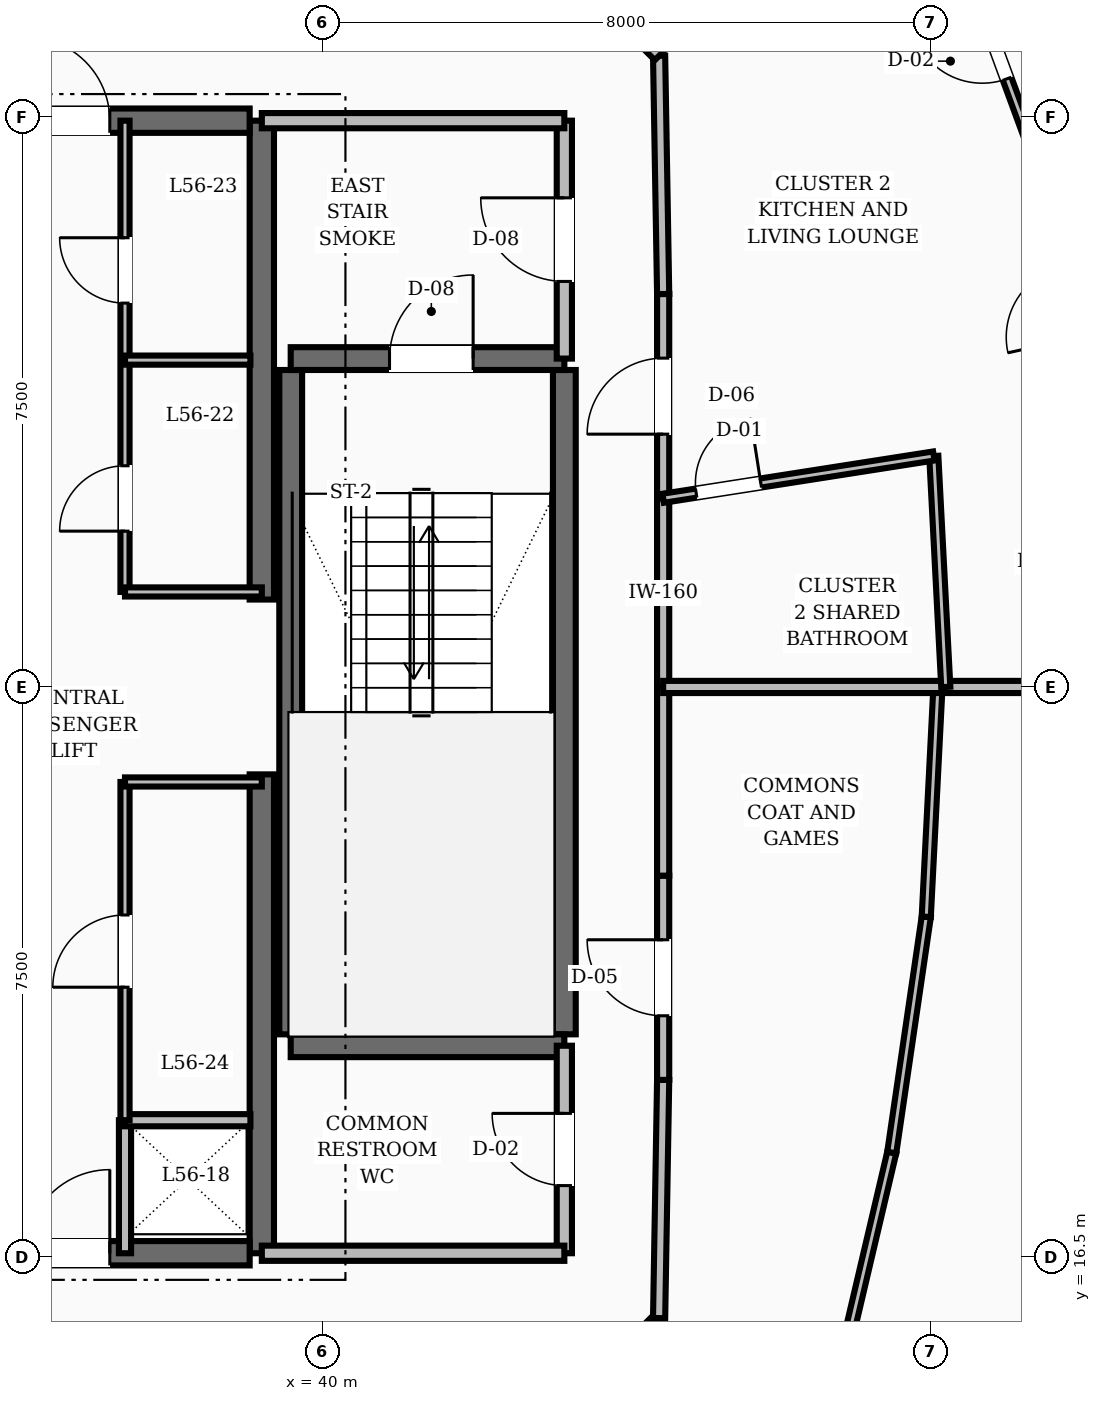
"""IFC4 building model, lengths in metres.
Left out: names, types, materials, properties, quantities, classifications, styles, units other than length and angle.
Written with IfcOpenShell. Run it as: python <this file> out.ifc"""

import sys

from ifc_helpers import new_model, si_unit, direction, frame, frame_2d, origin, place, context, subcontext, project, spatial, rectangle, extrude, element, fill, save


model = new_model("IFC4")
c1 = context("Model", 3, precision=1e-05, world=origin(), true_north=direction((0.0, 1.0)))
c2 = subcontext(c1, "Body", "Model", "MODEL_VIEW")
j1 = project(units=[si_unit("LENGTHUNIT", "METRE"), si_unit("PLANEANGLEUNIT", "RADIAN")], contexts=[c1])
p1 = place(None, origin())
s1 = spatial("IfcSite", under=j1, at=p1, CompositionType="ELEMENT")
p2 = place(p1, origin())
s2 = spatial("IfcBuilding", under=s1, at=p2, CompositionType="ELEMENT")
p3 = place(p2, frame((0.0, 0.0, 218.4)))
s3 = spatial("IfcBuildingStorey", under=s2, at=p3, CompositionType="ELEMENT", Elevation=218.4)
for number, where, z_axis, x_axis in (
    (1, (39.2, 16.55, 0.0), (0.0, 0.0, 1.0), (0.0, 1.0, 0.0)),
    (2, (39.2, 25.15, 0.0), (0.0, 0.0, 1.0), (0.0, 1.0, 0.0)),
):
    element("IfcWall", number, at=place(p3, frame(where, z_axis=z_axis, x_axis=x_axis)), inside=s3, PredefinedType="SHEAR", context=c2, shape_type="SweptSolid", body=[
        extrude(rectangle(XDim=6.3, YDim=0.32, at=frame_2d((3.15, 0.0))), origin(), (0.0, 0.0, 1.0), 3.6),
    ])
p4 = place(p3, frame((35.8, 16.55, 0.0), z_axis=(0.0, 0.0, 1.0), x_axis=(1.0, 0.0, 0.0)))
e3 = element("IfcWall", 3, at=p4, inside=s3, PredefinedType="SHEAR", context=c2, shape_type="SweptSolid", body=[
    extrude(rectangle(XDim=3.24, YDim=0.32, at=frame_2d((1.62, 0.0))), origin(), (0.0, 0.0, 1.0), 3.6),
])
p5 = place(p4, frame((0.3, 0.0, 0.0)))
e4 = element("IfcOpeningElement", 4, at=p5, cuts=e3, PredefinedType="OPENING", context=c2, shape_type="SweptSolid", body=[
    extrude(rectangle(XDim=1.1, YDim=2.1, at=frame_2d((0.55, 1.05))), frame((0.0, 0.17, 0.0), z_axis=(0.0, -1.0, 0.0), x_axis=(1.0, 0.0, 0.0)), (0.0, 0.0, 1.0), 0.34),
])
p6 = place(p3, frame((35.8, 31.45, 0.0), z_axis=(0.0, 0.0, 1.0), x_axis=(1.0, 0.0, 0.0)))
e5 = element("IfcWall", 5, at=p6, inside=s3, PredefinedType="SHEAR", context=c2, shape_type="SweptSolid", body=[
    extrude(rectangle(XDim=3.24, YDim=0.32, at=frame_2d((1.62, 0.0))), origin(), (0.0, 0.0, 1.0), 3.6),
])
p7 = place(p6, frame((0.3, 0.0, 0.0)))
e6 = element("IfcOpeningElement", 6, at=p7, cuts=e5, PredefinedType="OPENING", context=c2, shape_type="SweptSolid", body=[
    extrude(rectangle(XDim=1.1, YDim=2.1, at=frame_2d((0.55, 1.05))), frame((0.0, 0.17, 0.0), z_axis=(0.0, -1.0, 0.0), x_axis=(1.0, 0.0, 0.0)), (0.0, 0.0, 1.0), 0.34),
])
for number, where, z_axis, x_axis in (
    (7, (43.18, 19.43, 0.0), (0.0, 0.0, 1.0), (0.0, 1.0, 0.0)),
    (8, (39.58, 19.43, 0.0), (0.0, 0.0, 1.0), (0.0, 1.0, 0.0)),
):
    element("IfcWall", number, at=place(p3, frame(where, z_axis=z_axis, x_axis=x_axis)), inside=s3, PredefinedType="SHEAR", context=c2, shape_type="SweptSolid", body=[
        extrude(rectangle(XDim=8.74, YDim=0.3, at=frame_2d((4.37, 0.0))), origin(), (0.0, 0.0, 1.0), 3.6),
    ])
p8 = place(p3, frame((39.58, 19.28, 0.0), z_axis=(0.0, 0.0, 1.0), x_axis=(1.0, 0.0, 0.0)))
e9 = element("IfcWall", 9, at=p8, inside=s3, PredefinedType="SHEAR", context=c2, shape_type="SweptSolid", body=[
    extrude(rectangle(XDim=3.6, YDim=0.3, at=frame_2d((1.8, 0.0))), origin(), (0.0, 0.0, 1.0), 3.6),
])
p9 = place(p3, frame((39.58, 28.32, 0.0), z_axis=(0.0, 0.0, 1.0), x_axis=(1.0, 0.0, 0.0)))
e10 = element("IfcWall", 10, at=p9, inside=s3, PredefinedType="SHEAR", context=c2, shape_type="SweptSolid", body=[
    extrude(rectangle(XDim=3.6, YDim=0.3, at=frame_2d((1.8, 0.0))), origin(), (0.0, 0.0, 1.0), 3.6),
])
p10 = place(p9, frame((1.3, 0.0, 0.0)))
e11 = element("IfcOpeningElement", 11, at=p10, cuts=e10, PredefinedType="OPENING", context=c2, shape_type="SweptSolid", body=[
    extrude(rectangle(XDim=1.1, YDim=2.1, at=frame_2d((0.55, 1.05))), frame((0.0, 0.16, 0.0), z_axis=(0.0, -1.0, 0.0), x_axis=(1.0, 0.0, 0.0)), (0.0, 0.0, 1.0), 0.32),
])
p11 = place(p3, frame((43.18, 28.32, 0.0), z_axis=(0.0, 0.0, 1.0), x_axis=(0.0, 1.0, 0.0)))
e12 = element("IfcWall", 12, at=p11, inside=s3, PredefinedType="SOLIDWALL", context=c2, shape_type="SweptSolid", body=[
    extrude(rectangle(XDim=3.13, YDim=0.2, at=frame_2d((1.565, 0.0))), origin(), (0.0, 0.0, 1.0), 2.87),
])
p12 = place(p11, frame((1.015, 0.0, 0.0)))
e13 = element("IfcOpeningElement", 13, at=p12, cuts=e12, PredefinedType="OPENING", context=c2, shape_type="SweptSolid", body=[
    extrude(rectangle(XDim=1.1, YDim=2.1, at=frame_2d((0.55, 1.05))), frame((0.0, 0.11, 0.0), z_axis=(0.0, -1.0, 0.0), x_axis=(1.0, 0.0, 0.0)), (0.0, 0.0, 1.0), 0.22),
])
p13 = place(p3, frame((39.2, 31.45, 0.0), z_axis=(0.0, 0.0, 1.0), x_axis=(1.0, 0.0, 0.0)))
e14 = element("IfcWall", 14, at=p13, inside=s3, PredefinedType="SOLIDWALL", context=c2, shape_type="SweptSolid", body=[
    extrude(rectangle(XDim=3.98, YDim=0.2, at=frame_2d((1.99, 0.0))), origin(), (0.0, 0.0, 1.0), 2.87),
])
p14 = place(p3, frame((43.18, 16.55, 0.0), z_axis=(0.0, 0.0, 1.0), x_axis=(0.0, 1.0, 0.0)))
e15 = element("IfcWall", 15, at=p14, inside=s3, PredefinedType="SOLIDWALL", context=c2, shape_type="SweptSolid", body=[
    extrude(rectangle(XDim=2.73, YDim=0.2, at=frame_2d((1.365, 0.0))), origin(), (0.0, 0.0, 1.0), 2.87),
])
p15 = place(p14, frame((0.89, 0.0, 0.0)))
e16 = element("IfcOpeningElement", 16, at=p15, cuts=e15, PredefinedType="OPENING", context=c2, shape_type="SweptSolid", body=[
    extrude(rectangle(XDim=0.95, YDim=2.1, at=frame_2d((0.475, 1.05))), frame((0.0, 0.11, 0.0), z_axis=(0.0, -1.0, 0.0), x_axis=(1.0, 0.0, 0.0)), (0.0, 0.0, 1.0), 0.22),
])
p16 = place(p3, frame((39.2, 16.55, 0.0), z_axis=(0.0, 0.0, 1.0), x_axis=(1.0, 0.0, 0.0)))
e17 = element("IfcWall", 17, at=p16, inside=s3, PredefinedType="SOLIDWALL", context=c2, shape_type="SweptSolid", body=[
    extrude(rectangle(XDim=3.98, YDim=0.2, at=frame_2d((1.99, 0.0))), origin(), (0.0, 0.0, 1.0), 2.87),
])
p17 = place(p3, frame((37.4, 16.55, 0.0), z_axis=(0.0, 0.0, 1.0), x_axis=(0.0, 1.0, 0.0)))
e18 = element("IfcWall", 18, at=p17, inside=s3, PredefinedType="SOLIDWALL", context=c2, shape_type="SweptSolid", body=[
    extrude(rectangle(XDim=1.75, YDim=0.16, at=frame_2d((0.875, 0.0))), origin(), (0.0, 0.0, 1.0), 2.87),
])
p18 = place(p3, frame((37.4, 18.3, 0.0), z_axis=(0.0, 0.0, 1.0), x_axis=(1.0, 0.0, 0.0)))
e19 = element("IfcWall", 19, at=p18, inside=s3, PredefinedType="SOLIDWALL", context=c2, shape_type="SweptSolid", body=[
    extrude(rectangle(XDim=1.65, YDim=0.16, at=frame_2d((0.825, 0.0))), origin(), (0.0, 0.0, 1.0), 2.87),
])
p19 = place(p3, frame((37.4, 25.25, 0.0), z_axis=(0.0, 0.0, 1.0), x_axis=(0.0, 1.0, 0.0)))
e20 = element("IfcWall", 20, at=p19, inside=s3, PredefinedType="PARTITIONING", context=c2, shape_type="SweptSolid", body=[
    extrude(rectangle(XDim=6.2, YDim=0.12, at=frame_2d((3.1, 0.0))), origin(), (0.0, 0.0, 1.0), 2.87),
])
p20 = place(p19, frame((0.8, 0.0, 0.0)))
e21 = element("IfcOpeningElement", 21, at=p20, cuts=e20, PredefinedType="OPENING", context=c2, shape_type="SweptSolid", body=[
    extrude(rectangle(XDim=0.86, YDim=2.1, at=frame_2d((0.43, 1.05))), frame((0.0, 0.07, 0.0), z_axis=(0.0, -1.0, 0.0), x_axis=(1.0, 0.0, 0.0)), (0.0, 0.0, 1.0), 0.14),
])
p21 = place(p19, frame((3.8, 0.0, 0.0)))
e22 = element("IfcOpeningElement", 22, at=p21, cuts=e20, PredefinedType="OPENING", context=c2, shape_type="SweptSolid", body=[
    extrude(rectangle(XDim=0.86, YDim=2.1, at=frame_2d((0.43, 1.05))), frame((0.0, 0.07, 0.0), z_axis=(0.0, -1.0, 0.0), x_axis=(1.0, 0.0, 0.0)), (0.0, 0.0, 1.0), 0.14),
])
p22 = place(p3, frame((37.4, 25.25, 0.0), z_axis=(0.0, 0.0, 1.0), x_axis=(1.0, 0.0, 0.0)))
e23 = element("IfcWall", 23, at=p22, inside=s3, PredefinedType="PARTITIONING", context=c2, shape_type="SweptSolid", body=[
    extrude(rectangle(XDim=1.8, YDim=0.12, at=frame_2d((0.9, 0.0))), origin(), (0.0, 0.0, 1.0), 2.87),
])
p23 = place(p3, frame((37.4, 18.3, 0.0), z_axis=(0.0, 0.0, 1.0), x_axis=(0.0, 1.0, 0.0)))
e24 = element("IfcWall", 24, at=p23, inside=s3, PredefinedType="PARTITIONING", context=c2, shape_type="SweptSolid", body=[
    extrude(rectangle(XDim=4.45, YDim=0.12, at=frame_2d((2.225, 0.0))), origin(), (0.0, 0.0, 1.0), 2.87),
])
p24 = place(p23, frame((1.75, 0.0, 0.0)))
e25 = element("IfcOpeningElement", 25, at=p24, cuts=e24, PredefinedType="OPENING", context=c2, shape_type="SweptSolid", body=[
    extrude(rectangle(XDim=0.95, YDim=2.1, at=frame_2d((0.475, 1.05))), frame((0.0, 0.07, 0.0), z_axis=(0.0, -1.0, 0.0), x_axis=(1.0, 0.0, 0.0)), (0.0, 0.0, 1.0), 0.14),
])
p25 = place(p3, frame((37.4, 22.75, 0.0), z_axis=(0.0, 0.0, 1.0), x_axis=(1.0, 0.0, 0.0)))
e26 = element("IfcWall", 26, at=p25, inside=s3, PredefinedType="PARTITIONING", context=c2, shape_type="SweptSolid", body=[
    extrude(rectangle(XDim=1.8, YDim=0.12, at=frame_2d((0.9, 0.0))), origin(), (0.0, 0.0, 1.0), 2.87),
])
p26 = place(p3, frame((37.4, 28.3, 0.0), z_axis=(0.0, 0.0, 1.0), x_axis=(1.0, 0.0, 0.0)))
e27 = element("IfcWall", 27, at=p26, inside=s3, PredefinedType="PARTITIONING", context=c2, shape_type="SweptSolid", body=[
    extrude(rectangle(XDim=1.65, YDim=0.12, at=frame_2d((0.825, 0.0))), origin(), (0.0, 0.0, 1.0), 2.87),
])
p27 = place(p3, frame((44.48, 24.0, 0.0), z_axis=(0.0, 0.0, 1.0), x_axis=(0.0, 1.0, 0.0)))
e28 = element("IfcWall", 28, at=p27, inside=s3, PredefinedType="SOLIDWALL", context=c2, shape_type="SweptSolid", body=[
    extrude(rectangle(XDim=2.482, YDim=0.16, at=frame_2d((1.241, 0.0))), origin(), (0.0, 0.0, 1.0), 2.87),
])
p28 = place(p3, frame((44.48, 26.482, 0.0), z_axis=(0.0, 0.0, 1.0), x_axis=(0.0, 1.0, 0.0)))
e29 = element("IfcWall", 29, at=p28, inside=s3, PredefinedType="SOLIDWALL", context=c2, shape_type="SweptSolid", body=[
    extrude(rectangle(XDim=2.687, YDim=0.16, at=frame_2d((1.344, 0.0))), origin(), (0.0, 0.0, 1.0), 2.87),
])
p29 = place(p28, frame((0.844, 0.0, 0.0)))
e30 = element("IfcOpeningElement", 30, at=p29, cuts=e29, PredefinedType="OPENING", context=c2, shape_type="SweptSolid", body=[
    extrude(rectangle(XDim=1.0, YDim=2.1, at=frame_2d((0.5, 1.05))), frame((0.0, 0.09, 0.0), z_axis=(0.0, -1.0, 0.0), x_axis=(1.0, 0.0, 0.0)), (0.0, 0.0, 1.0), 0.18),
])
p30 = place(p3, frame((44.48, 29.169, 0.0), z_axis=(0.0, 0.0, 1.0), x_axis=(-0.016981035134, 0.999855811828, 0.0)))
e31 = element("IfcWall", 31, at=p30, inside=s3, PredefinedType="SOLIDWALL", context=c2, shape_type="SweptSolid", body=[
    extrude(rectangle(XDim=3.134, YDim=0.16, at=frame_2d((1.567, 0.0))), origin(), (0.0, 0.0, 1.0), 2.87),
])
for number, where, z_axis, x_axis in (
    (32, (44.427, 32.303, 0.0), (0.0, 0.0, 1.0), (-0.707, 0.707, 0.0)),
    (33, (42.365, 13.635, 0.0), (0.0, 0.0, 1.0), (0.707, 0.707, 0.0)),
):
    element("IfcWall", number, at=place(p3, frame(where, z_axis=z_axis, x_axis=x_axis)), inside=s3, PredefinedType="SOLIDWALL", context=c2, shape_type="SweptSolid", body=[
        extrude(rectangle(XDim=2.916, YDim=0.16, at=frame_2d((1.458, 0.0))), origin(), (0.0, 0.0, 1.0), 2.87),
    ])
p31 = place(p3, frame((44.427, 15.697, 0.0), z_axis=(0.0, 0.0, 1.0), x_axis=(0.016981035134, 0.999855811828, 0.0)))
e34 = element("IfcWall", 34, at=p31, inside=s3, PredefinedType="SOLIDWALL", context=c2, shape_type="SweptSolid", body=[
    extrude(rectangle(XDim=3.134, YDim=0.16, at=frame_2d((1.567, 0.0))), origin(), (0.0, 0.0, 1.0), 2.87),
])
p32 = place(p3, frame((44.48, 18.831, 0.0), z_axis=(0.0, 0.0, 1.0), x_axis=(0.0, 1.0, 0.0)))
e35 = element("IfcWall", 35, at=p32, inside=s3, PredefinedType="SOLIDWALL", context=c2, shape_type="SweptSolid", body=[
    extrude(rectangle(XDim=2.687, YDim=0.16, at=frame_2d((1.344, 0.0))), origin(), (0.0, 0.0, 1.0), 2.87),
])
p33 = place(p32, frame((0.844, 0.0, 0.0)))
e36 = element("IfcOpeningElement", 36, at=p33, cuts=e35, PredefinedType="OPENING", context=c2, shape_type="SweptSolid", body=[
    extrude(rectangle(XDim=1.0, YDim=2.1, at=frame_2d((0.5, 1.05))), frame((0.0, 0.09, 0.0), z_axis=(0.0, -1.0, 0.0), x_axis=(1.0, 0.0, 0.0)), (0.0, 0.0, 1.0), 0.18),
])
p34 = place(p3, frame((44.48, 21.518, 0.0), z_axis=(0.0, 0.0, 1.0), x_axis=(0.0, 1.0, 0.0)))
e37 = element("IfcWall", 37, at=p34, inside=s3, PredefinedType="SOLIDWALL", context=c2, shape_type="SweptSolid", body=[
    extrude(rectangle(XDim=2.482, YDim=0.16, at=frame_2d((1.241, 0.0))), origin(), (0.0, 0.0, 1.0), 2.87),
])
p35 = place(p3, frame((46.715, 14.588, 0.0), z_axis=(0.0, 0.0, 1.0), x_axis=(0.228745067829, 0.97348636043, 0.0)))
e38 = element("IfcWall", 38, at=p35, inside=s3, PredefinedType="PARTITIONING", context=c2, shape_type="SweptSolid", body=[
    extrude(rectangle(XDim=3.376, YDim=0.12, at=frame_2d((1.688, 0.0))), origin(), (0.0, 0.0, 1.0), 2.87),
])
p36 = place(p3, frame((47.487, 17.875, 0.0), z_axis=(0.0, 0.0, 1.0), x_axis=(0.144920046389, 0.989443368847, 0.0)))
e39 = element("IfcWall", 39, at=p36, inside=s3, PredefinedType="PARTITIONING", context=c2, shape_type="SweptSolid", body=[
    extrude(rectangle(XDim=3.135, YDim=0.12, at=frame_2d((1.568, 0.0))), origin(), (0.0, 0.0, 1.0), 2.87),
])
p37 = place(p3, frame((47.942, 20.977, 0.0), z_axis=(0.0, 0.0, 1.0), x_axis=(0.050645517022, 0.998716692364, 0.0)))
e40 = element("IfcWall", 40, at=p37, inside=s3, PredefinedType="PARTITIONING", context=c2, shape_type="SweptSolid", body=[
    extrude(rectangle(XDim=3.027, YDim=0.12, at=frame_2d((1.514, 0.0))), origin(), (0.0, 0.0, 1.0), 2.87),
])
p38 = place(p3, frame((44.48, 24.0, 0.0), z_axis=(0.0, 0.0, 1.0), x_axis=(1.0, 0.0, 0.0)))
e41 = element("IfcWall", 41, at=p38, inside=s3, PredefinedType="SOLIDWALL", context=c2, shape_type="SweptSolid", body=[
    extrude(rectangle(XDim=10.279, YDim=0.16, at=frame_2d((5.139, 0.0))), origin(), (0.0, 0.0, 1.0), 2.87),
])
p39 = place(p3, frame((48.198, 24.0, 0.0), z_axis=(0.0, 0.0, 1.0), x_axis=(-0.051830297727, 0.998655906826, 0.0)))
e42 = element("IfcWall", 42, at=p39, inside=s3, PredefinedType="PARTITIONING", context=c2, shape_type="SweptSolid", body=[
    extrude(rectangle(XDim=3.043, YDim=0.12, at=frame_2d((1.521, 0.0))), origin(), (0.0, 0.0, 1.0), 2.87),
])
p40 = place(p3, frame((44.48, 26.482, 0.0), z_axis=(0.0, 0.0, 1.0), x_axis=(0.988009450348, 0.154393413147, 0.0)))
e43 = element("IfcWall", 43, at=p40, inside=s3, PredefinedType="PARTITIONING", context=c2, shape_type="SweptSolid", body=[
    extrude(rectangle(XDim=3.604, YDim=0.12, at=frame_2d((1.802, 0.0))), origin(), (0.0, 0.0, 1.0), 2.87),
])
p41 = place(p40, frame((0.44, 0.0, 0.0)))
e44 = element("IfcOpeningElement", 44, at=p41, cuts=e43, PredefinedType="OPENING", context=c2, shape_type="SweptSolid", body=[
    extrude(rectangle(XDim=0.86, YDim=2.1, at=frame_2d((0.43, 1.05))), frame((0.0, 0.07, 0.0), z_axis=(0.0, -1.0, 0.0), x_axis=(1.0, 0.0, 0.0)), (0.0, 0.0, 1.0), 0.14),
])
p42 = place(p3, frame((49.464, 30.754, 0.0), z_axis=(0.0, 0.0, 1.0), x_axis=(-0.345027950541, 0.938592410659, 0.0)))
e45 = element("IfcWall", 45, at=p42, inside=s3, PredefinedType="PARTITIONING", context=c2, shape_type="SweptSolid", body=[
    extrude(rectangle(XDim=3.608, YDim=0.12, at=frame_2d((1.804, 0.0))), origin(), (0.0, 0.0, 1.0), 2.87),
])
p43 = place(p42, frame((1.329, 0.0, 0.0)))
e46 = element("IfcOpeningElement", 46, at=p43, cuts=e45, PredefinedType="OPENING", context=c2, shape_type="SweptSolid", body=[
    extrude(rectangle(XDim=0.95, YDim=2.1, at=frame_2d((0.475, 1.05))), frame((0.0, 0.07, 0.0), z_axis=(0.0, -1.0, 0.0), x_axis=(1.0, 0.0, 0.0)), (0.0, 0.0, 1.0), 0.14),
])
p44 = place(p10, origin())
e47 = element("IfcDoor", 47, at=p44, inside=s3, OperationType="SINGLE_SWING_RIGHT", PredefinedType="DOOR", context=c2, shape_type="SweptSolid", body=[
    extrude(rectangle(XDim=1.1, YDim=2.1, at=frame_2d((0.55, 1.05))), frame((0.0, 0.025, 0.0), z_axis=(0.0, -1.0, 0.0), x_axis=(1.0, 0.0, 0.0)), (0.0, 0.0, 1.0), 0.05),
])
fill(e11, e47)
p45 = place(p12, origin())
e48 = element("IfcDoor", 48, at=p45, inside=s3, OperationType="SINGLE_SWING_RIGHT", PredefinedType="DOOR", context=c2, shape_type="SweptSolid", body=[
    extrude(rectangle(XDim=1.1, YDim=2.1, at=frame_2d((0.55, 1.05))), frame((0.0, 0.025, 0.0), z_axis=(0.0, -1.0, 0.0), x_axis=(1.0, 0.0, 0.0)), (0.0, 0.0, 1.0), 0.05),
])
fill(e13, e48)
p46 = place(p15, origin())
e49 = element("IfcDoor", 49, at=p46, inside=s3, OperationType="SINGLE_SWING_RIGHT", PredefinedType="DOOR", context=c2, shape_type="SweptSolid", body=[
    extrude(rectangle(XDim=0.95, YDim=2.1, at=frame_2d((0.475, 1.05))), frame((0.0, 0.025, 0.0), z_axis=(0.0, -1.0, 0.0), x_axis=(1.0, 0.0, 0.0)), (0.0, 0.0, 1.0), 0.05),
])
fill(e16, e49)
p47 = place(p7, origin())
e50 = element("IfcDoor", 50, at=p47, inside=s3, OperationType="SINGLE_SWING_LEFT", PredefinedType="DOOR", context=c2, shape_type="SweptSolid", body=[
    extrude(rectangle(XDim=1.1, YDim=2.1, at=frame_2d((0.55, 1.05))), frame((0.0, 0.025, 0.0), z_axis=(0.0, -1.0, 0.0), x_axis=(1.0, 0.0, 0.0)), (0.0, 0.0, 1.0), 0.05),
])
fill(e6, e50)
p48 = place(p5, origin())
e51 = element("IfcDoor", 51, at=p48, inside=s3, OperationType="SINGLE_SWING_RIGHT", PredefinedType="DOOR", context=c2, shape_type="SweptSolid", body=[
    extrude(rectangle(XDim=1.1, YDim=2.1, at=frame_2d((0.55, 1.05))), frame((0.0, 0.025, 0.0), z_axis=(0.0, -1.0, 0.0), x_axis=(1.0, 0.0, 0.0)), (0.0, 0.0, 1.0), 0.05),
])
fill(e4, e51)
p49 = place(p20, origin())
e52 = element("IfcDoor", 52, at=p49, inside=s3, OperationType="SINGLE_SWING_LEFT", PredefinedType="DOOR", context=c2, shape_type="SweptSolid", body=[
    extrude(rectangle(XDim=0.86, YDim=2.1, at=frame_2d((0.43, 1.05))), frame((0.0, 0.025, 0.0), z_axis=(0.0, -1.0, 0.0), x_axis=(1.0, 0.0, 0.0)), (0.0, 0.0, 1.0), 0.05),
])
fill(e21, e52)
p50 = place(p21, origin())
e53 = element("IfcDoor", 53, at=p50, inside=s3, OperationType="SINGLE_SWING_RIGHT", PredefinedType="DOOR", context=c2, shape_type="SweptSolid", body=[
    extrude(rectangle(XDim=0.86, YDim=2.1, at=frame_2d((0.43, 1.05))), frame((0.0, 0.025, 0.0), z_axis=(0.0, -1.0, 0.0), x_axis=(1.0, 0.0, 0.0)), (0.0, 0.0, 1.0), 0.05),
])
fill(e22, e53)
p51 = place(p24, origin())
e54 = element("IfcDoor", 54, at=p51, inside=s3, OperationType="SINGLE_SWING_LEFT", PredefinedType="DOOR", context=c2, shape_type="SweptSolid", body=[
    extrude(rectangle(XDim=0.95, YDim=2.1, at=frame_2d((0.475, 1.05))), frame((0.0, 0.025, 0.0), z_axis=(0.0, -1.0, 0.0), x_axis=(1.0, 0.0, 0.0)), (0.0, 0.0, 1.0), 0.05),
])
fill(e25, e54)
p52 = place(p33, origin())
e55 = element("IfcDoor", 55, at=p52, inside=s3, OperationType="SINGLE_SWING_RIGHT", PredefinedType="DOOR", context=c2, shape_type="SweptSolid", body=[
    extrude(rectangle(XDim=1.0, YDim=2.1, at=frame_2d((0.5, 1.05))), frame((0.0, 0.025, 0.0), z_axis=(0.0, -1.0, 0.0), x_axis=(1.0, 0.0, 0.0)), (0.0, 0.0, 1.0), 0.05),
])
fill(e36, e55)
p53 = place(p41, origin())
e56 = element("IfcDoor", 56, at=p53, inside=s3, OperationType="SINGLE_SWING_RIGHT", PredefinedType="DOOR", context=c2, shape_type="SweptSolid", body=[
    extrude(rectangle(XDim=0.86, YDim=2.1, at=frame_2d((0.43, 1.05))), frame((0.0, 0.025, 0.0), z_axis=(0.0, -1.0, 0.0), x_axis=(1.0, 0.0, 0.0)), (0.0, 0.0, 1.0), 0.05),
])
fill(e44, e56)
p54 = place(p29, origin())
e57 = element("IfcDoor", 57, at=p54, inside=s3, OperationType="SINGLE_SWING_LEFT", PredefinedType="DOOR", context=c2, shape_type="SweptSolid", body=[
    extrude(rectangle(XDim=1.0, YDim=2.1, at=frame_2d((0.5, 1.05))), frame((0.0, 0.025, 0.0), z_axis=(0.0, -1.0, 0.0), x_axis=(1.0, 0.0, 0.0)), (0.0, 0.0, 1.0), 0.05),
])
fill(e30, e57)
p55 = place(p43, origin())
e58 = element("IfcDoor", 58, at=p55, inside=s3, OperationType="SINGLE_SWING_RIGHT", PredefinedType="DOOR", context=c2, shape_type="SweptSolid", body=[
    extrude(rectangle(XDim=0.95, YDim=2.1, at=frame_2d((0.475, 1.05))), frame((0.0, 0.025, 0.0), z_axis=(0.0, -1.0, 0.0), x_axis=(1.0, 0.0, 0.0)), (0.0, 0.0, 1.0), 0.05),
])
fill(e46, e58)
save(model, sys.argv[1])
